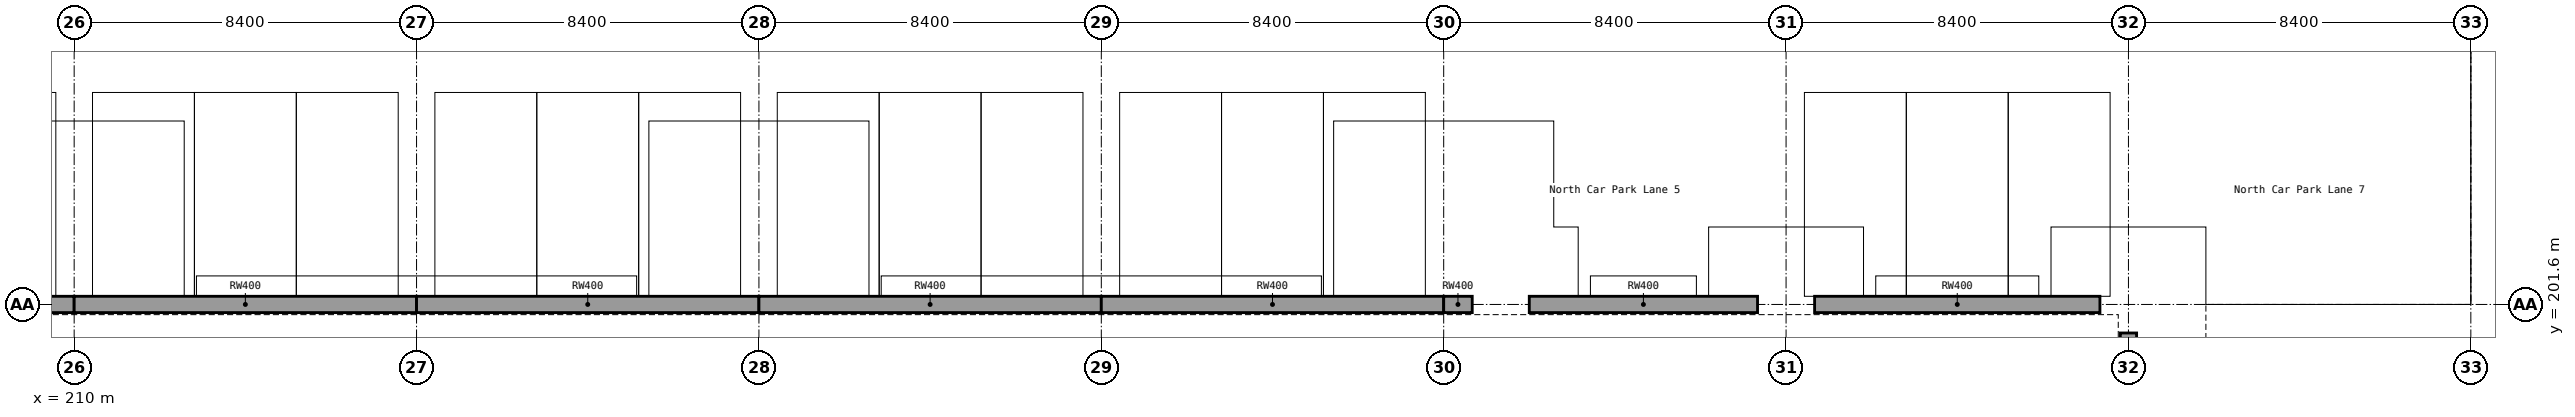
"""IFC4 building model, lengths in metres.
Left out: names, types, materials, properties, quantities, classifications, styles, units other than length and angle.
Written with IfcOpenShell. Run it as: python <this file> out.ifc"""

import sys

from ifc_helpers import new_model, si_unit, direction, frame, frame_2d, origin, place, context, subcontext, project, spatial, rectangle, extrude, element, save


model = new_model("IFC4")
c1 = context("Model", 3, precision=1e-05, world=origin(), true_north=direction((0.0, 1.0)))
c2 = subcontext(c1, "Body", "Model", "MODEL_VIEW")
j1 = project(units=[si_unit("LENGTHUNIT", "METRE"), si_unit("PLANEANGLEUNIT", "RADIAN")], contexts=[c1])
p1 = place(None, origin())
s1 = spatial("IfcSite", under=j1, at=p1, CompositionType="ELEMENT")
p2 = place(p1, origin())
s2 = spatial("IfcBuilding", under=s1, at=p2, CompositionType="ELEMENT")
p3 = place(p2, frame((0.0, 0.0, -3.0)))
s3 = spatial("IfcBuildingStorey", under=s2, at=p3, CompositionType="ELEMENT", Elevation=-3.0)
for number, where, z_axis, x_axis in (
    (1, (201.6, 201.6, 0.0), (0.0, 0.0, 1.0), (1.0, 0.0, 0.0)),
    (2, (210.0, 201.6, 0.0), (0.0, 0.0, 1.0), (1.0, 0.0, 0.0)),
):
    element("IfcWall", number, at=place(p3, frame(where, z_axis=z_axis, x_axis=x_axis)), inside=s3, PredefinedType="SOLIDWALL", context=c2, shape_type="SweptSolid", body=[
        extrude(rectangle(XDim=8.4, YDim=0.4, at=frame_2d((4.2, 0.0))), origin(), (0.0, 0.0, 1.0), 3.0),
    ])
p4 = place(p3, frame((218.4, 201.6, 0.0), z_axis=(0.0, 0.0, 1.0), x_axis=(1.0, 0.0, 0.0)))
e3 = element("IfcWall", 3, at=p4, inside=s3, PredefinedType="SOLIDWALL", context=c2, shape_type="SweptSolid", body=[
    extrude(rectangle(XDim=8.4, YDim=0.4, at=frame_2d((4.2, 0.0))), origin(), (0.0, 0.0, 1.0), 3.0),
])
p5 = place(p3, frame((226.8, 201.6, 0.0), z_axis=(0.0, 0.0, 1.0), x_axis=(1.0, 0.0, 0.0)))
e4 = element("IfcWall", 4, at=p5, inside=s3, PredefinedType="SOLIDWALL", context=c2, shape_type="SweptSolid", body=[
    extrude(rectangle(XDim=8.4, YDim=0.4, at=frame_2d((4.2, 0.0))), origin(), (0.0, 0.0, 1.0), 3.0),
])
p6 = place(p3, frame((235.2, 201.6, 0.0), z_axis=(0.0, 0.0, 1.0), x_axis=(1.0, 0.0, 0.0)))
e5 = element("IfcWall", 5, at=p6, inside=s3, PredefinedType="SOLIDWALL", context=c2, shape_type="SweptSolid", body=[
    extrude(rectangle(XDim=8.4, YDim=0.4, at=frame_2d((4.2, 0.0))), origin(), (0.0, 0.0, 1.0), 3.0),
])
p7 = place(p3, frame((243.6, 201.6, 0.0), z_axis=(0.0, 0.0, 1.0), x_axis=(1.0, 0.0, 0.0)))
e6 = element("IfcWall", 6, at=p7, inside=s3, PredefinedType="SOLIDWALL", context=c2, shape_type="SweptSolid", body=[
    extrude(rectangle(XDim=0.7, YDim=0.4, at=frame_2d((0.35, 0.0))), origin(), (0.0, 0.0, 1.0), 3.0),
])
p8 = place(p3, frame((245.7, 201.6, 0.0), z_axis=(0.0, 0.0, 1.0), x_axis=(1.0, 0.0, 0.0)))
e7 = element("IfcWall", 7, at=p8, inside=s3, PredefinedType="SOLIDWALL", context=c2, shape_type="SweptSolid", body=[
    extrude(rectangle(XDim=5.6, YDim=0.4, at=frame_2d((2.8, 0.0))), origin(), (0.0, 0.0, 1.0), 3.0),
])
for number, where, z_axis, x_axis in (
    (8, (252.7, 201.6, 0.0), (0.0, 0.0, 1.0), (1.0, 0.0, 0.0)),
    (9, (260.4, 200.9, 0.0), (0.0, 0.0, 1.0), (0.0, -1.0, 0.0)),
):
    element("IfcWall", number, at=place(p3, frame(where, z_axis=z_axis, x_axis=x_axis)), inside=s3, PredefinedType="SOLIDWALL", context=c2, shape_type="SweptSolid", body=[
        extrude(rectangle(XDim=7.0, YDim=0.4, at=frame_2d((3.5, 0.0))), origin(), (0.0, 0.0, 1.0), 3.0),
    ])
save(model, sys.argv[1])
